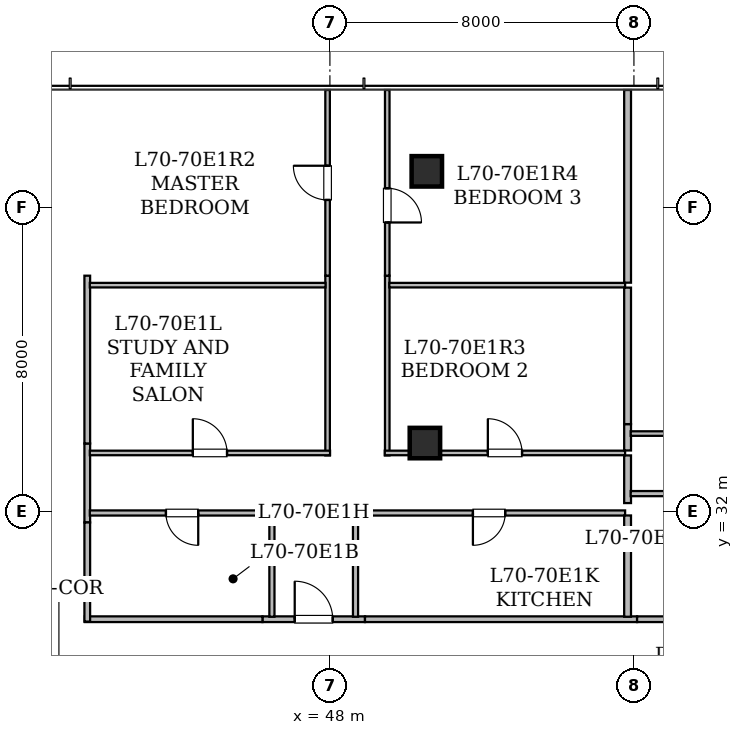
"""IFC4 building model, lengths in metres.
Left out: names, types, materials, properties, quantities, classifications, styles, units other than length and angle.
Written with IfcOpenShell. Run it as: python <this file> out.ifc"""

import sys

from ifc_helpers import new_model, si_unit, direction, frame, frame_2d, origin, origin_2d, place, context, subcontext, project, spatial, rectangle, hollow_rectangle, extrude, element, fill, save


model = new_model("IFC4")
c1 = context("Model", 3, precision=1e-05, world=origin(), true_north=direction((0.0, 1.0)))
c2 = subcontext(c1, "Body", "Model", "MODEL_VIEW")
j1 = project(units=[si_unit("LENGTHUNIT", "METRE"), si_unit("PLANEANGLEUNIT", "RADIAN")], contexts=[c1])
p1 = place(None, origin())
s1 = spatial("IfcSite", under=j1, at=p1, CompositionType="ELEMENT")
p2 = place(p1, origin())
s2 = spatial("IfcBuilding", under=s1, at=p2, CompositionType="ELEMENT")
p3 = place(p2, frame((0.0, 0.0, 273.65)))
s3 = spatial("IfcBuildingStorey", under=s2, at=p3, CompositionType="ELEMENT", Elevation=273.65)
p4 = place(p3, frame((50.55, 40.95, 0.0), z_axis=(0.0, 0.0, 1.0), x_axis=(1.0, 0.0, 0.0)))
e1 = element("IfcColumn", 1, at=p4, inside=s3, PredefinedType="COLUMN", context=c2, shape_type="SweptSolid", body=[
    extrude(hollow_rectangle(XDim=0.8, YDim=0.8, WallThickness=0.04, at=origin_2d()), origin(), (0.0, 0.0, 1.0), 4.175),
])
p5 = place(p3, frame((50.5, 33.8, 0.0), z_axis=(0.0, 0.0, 1.0), x_axis=(1.0, 0.0, 0.0)))
e2 = element("IfcColumn", 2, at=p5, inside=s3, PredefinedType="COLUMN", context=c2, shape_type="SweptSolid", body=[
    extrude(hollow_rectangle(XDim=0.8, YDim=0.8, WallThickness=0.04, at=origin_2d()), origin(), (0.0, 0.0, 1.0), 4.2),
])
p6 = place(p3, frame((46.225, 29.165, 0.0), z_axis=(0.0, 0.0, 1.0), x_axis=(1.0, 0.0, 0.0)))
e3 = element("IfcWall", 3, at=p6, inside=s3, PredefinedType="STANDARD", context=c2, shape_type="SweptSolid", body=[
    extrude(rectangle(XDim=2.698, YDim=0.15, at=frame_2d((1.349, 0.0))), origin(), (0.0, 0.0, 1.0), 3.78),
])
p7 = place(p6, frame((0.849, 0.0, 0.0)))
e4 = element("IfcOpeningElement", 4, at=p7, cuts=e3, PredefinedType="OPENING", context=c2, shape_type="SweptSolid", body=[
    extrude(rectangle(XDim=1.0, YDim=2.15, at=frame_2d((0.5, 1.075))), frame((0.0, 0.085, 0.0), z_axis=(0.0, -1.0, 0.0), x_axis=(1.0, 0.0, 0.0)), (0.0, 0.0, 1.0), 0.17),
])
p8 = place(p3, frame((41.615, 33.789, 0.0), z_axis=(0.0, 0.0, 1.0), x_axis=(0.0, -1.0, 0.0)))
e5 = element("IfcWall", 5, at=p8, inside=s3, PredefinedType="STANDARD", context=c2, shape_type="SweptSolid", body=[
    extrude(rectangle(XDim=2.078, YDim=0.15, at=frame_2d((1.039, 0.0))), origin(), (0.0, 0.0, 1.0), 3.78),
])
p9 = place(p3, frame((41.55, 29.165, 0.0), z_axis=(0.0, 0.0, 1.0), x_axis=(1.0, 0.0, 0.0)))
e6 = element("IfcWall", 6, at=p9, inside=s3, PredefinedType="STANDARD", context=c2, shape_type="SweptSolid", body=[
    extrude(rectangle(XDim=4.675, YDim=0.15, at=frame_2d((2.337, 0.0))), origin(), (0.0, 0.0, 1.0), 3.78),
])
p10 = place(p3, frame((41.615, 31.711, 0.0), z_axis=(0.0, 0.0, 1.0), x_axis=(0.0, -1.0, 0.0)))
e7 = element("IfcWall", 7, at=p10, inside=s3, PredefinedType="STANDARD", context=c2, shape_type="SweptSolid", body=[
    extrude(rectangle(XDim=2.609, YDim=0.15, at=frame_2d((1.304, 0.0))), origin(), (0.0, 0.0, 1.0), 3.78),
])
p11 = place(p3, frame((48.923, 29.165, 0.0), z_axis=(0.0, 0.0, 1.0), x_axis=(1.0, 0.0, 0.0)))
e8 = element("IfcWall", 8, at=p11, inside=s3, PredefinedType="STANDARD", context=c2, shape_type="SweptSolid", body=[
    extrude(rectangle(XDim=7.16, YDim=0.15, at=frame_2d((3.58, 0.0))), origin(), (0.0, 0.0, 1.0), 2.22),
])
p12 = place(p3, frame((41.615, 38.204, 0.0), z_axis=(0.0, 0.0, 1.0), x_axis=(0.0, -1.0, 0.0)))
e9 = element("IfcWall", 9, at=p12, inside=s3, PredefinedType="STANDARD", context=c2, shape_type="SweptSolid", body=[
    extrude(rectangle(XDim=4.415, YDim=0.15, at=frame_2d((2.208, 0.0))), origin(), (0.0, 0.0, 1.0), 2.22),
])
p13 = place(p3, frame((56.083, 29.165, 0.0), z_axis=(0.0, 0.0, 1.0), x_axis=(1.0, 0.0, 0.0)))
e10 = element("IfcWall", 10, at=p13, inside=s3, PredefinedType="STANDARD", context=c2, shape_type="SweptSolid", body=[
    extrude(rectangle(XDim=2.463, YDim=0.15, at=frame_2d((1.231, 0.0))), origin(), (0.0, 0.0, 1.0), 3.78),
])
p14 = place(p3, frame((46.474, 29.23, 0.0), z_axis=(0.0, 0.0, 1.0), x_axis=(0.0, 1.0, 0.0)))
e11 = element("IfcWall", 11, at=p14, inside=s3, PredefinedType="PARTITIONING", context=c2, shape_type="SweptSolid", body=[
    extrude(rectangle(XDim=2.795, YDim=0.135, at=frame_2d((1.397, 0.0))), origin(), (0.0, 0.0, 1.0), 3.78),
])
p15 = place(p3, frame((46.539, 31.96, 0.0), z_axis=(0.0, 0.0, 1.0), x_axis=(-1.0, 0.0, 0.0)))
e12 = element("IfcWall", 12, at=p15, inside=s3, PredefinedType="PARTITIONING", context=c2, shape_type="SweptSolid", body=[
    extrude(rectangle(XDim=4.857, YDim=0.135, at=frame_2d((2.429, 0.0))), origin(), (0.0, 0.0, 1.0), 3.78),
])
p16 = place(p15, frame((2.004, 0.0, 0.0)))
e13 = element("IfcOpeningElement", 13, at=p16, cuts=e12, PredefinedType="OPENING", context=c2, shape_type="SweptSolid", body=[
    extrude(rectangle(XDim=0.85, YDim=2.1, at=frame_2d((0.425, 1.05))), frame((0.0, 0.077, 0.0), z_axis=(0.0, -1.0, 0.0), x_axis=(1.0, 0.0, 0.0)), (0.0, 0.0, 1.0), 0.155),
])
p17 = place(p3, frame((55.768, 31.96, 0.0), z_axis=(0.0, 0.0, 1.0), x_axis=(-1.0, 0.0, 0.0)))
e14 = element("IfcWall", 14, at=p17, inside=s3, PredefinedType="PARTITIONING", context=c2, shape_type="SweptSolid", body=[
    extrude(rectangle(XDim=7.159, YDim=0.135, at=frame_2d((3.58, 0.0))), origin(), (0.0, 0.0, 1.0), 2.22),
])
p18 = place(p17, frame((3.155, 0.0, 0.0)))
e15 = element("IfcOpeningElement", 15, at=p18, cuts=e14, PredefinedType="OPENING", context=c2, shape_type="SweptSolid", body=[
    extrude(rectangle(XDim=0.85, YDim=2.1, at=frame_2d((0.425, 1.05))), frame((0.0, 0.077, 0.0), z_axis=(0.0, -1.0, 0.0), x_axis=(1.0, 0.0, 0.0)), (0.0, 0.0, 1.0), 0.155),
])
p19 = place(p3, frame((48.674, 32.025, 0.0), z_axis=(0.0, 0.0, 1.0), x_axis=(0.0, -1.0, 0.0)))
e16 = element("IfcWall", 16, at=p19, inside=s3, PredefinedType="PARTITIONING", context=c2, shape_type="SweptSolid", body=[
    extrude(rectangle(XDim=2.795, YDim=0.135, at=frame_2d((1.397, 0.0))), origin(), (0.0, 0.0, 1.0), 3.78),
])
p20 = place(p3, frame((47.939, 33.475, 0.0), z_axis=(0.0, 0.0, 1.0), x_axis=(0.0, 1.0, 0.0)))
e17 = element("IfcWall", 17, at=p20, inside=s3, PredefinedType="PARTITIONING", context=c2, shape_type="SweptSolid", body=[
    extrude(rectangle(XDim=4.729, YDim=0.12, at=frame_2d((2.365, 0.0))), origin(), (0.0, 0.0, 1.0), 2.22),
])
p21 = place(p3, frame((41.682, 33.54, 0.0), z_axis=(0.0, 0.0, 1.0), x_axis=(1.0, 0.0, 0.0)))
e18 = element("IfcWall", 18, at=p21, inside=s3, PredefinedType="PARTITIONING", context=c2, shape_type="SweptSolid", body=[
    extrude(rectangle(XDim=6.322, YDim=0.12, at=frame_2d((3.161, 0.0))), origin(), (0.0, 0.0, 1.0), 3.78),
])
p22 = place(p21, frame((2.711, 0.0, 0.0)))
e19 = element("IfcOpeningElement", 19, at=p22, cuts=e18, PredefinedType="OPENING", context=c2, shape_type="SweptSolid", body=[
    extrude(rectangle(XDim=0.9, YDim=2.1, at=frame_2d((0.45, 1.05))), frame((0.0, 0.07, 0.0), z_axis=(0.0, -1.0, 0.0), x_axis=(1.0, 0.0, 0.0)), (0.0, 0.0, 1.0), 0.14),
])
p23 = place(p3, frame((47.939, 38.204, 0.0), z_axis=(0.0, 0.0, 1.0), x_axis=(0.0, 1.0, 0.0)))
e20 = element("IfcWall", 20, at=p23, inside=s3, PredefinedType="PARTITIONING", context=c2, shape_type="SweptSolid", body=[
    extrude(rectangle(XDim=4.886, YDim=0.12, at=frame_2d((2.443, 0.0))), origin(), (0.0, 0.0, 1.0), 2.22),
])
p24 = place(p23, frame((1.993, 0.0, 0.0)))
e21 = element("IfcOpeningElement", 21, at=p24, cuts=e20, PredefinedType="OPENING", context=c2, shape_type="SweptSolid", body=[
    extrude(rectangle(XDim=0.9, YDim=2.1, at=frame_2d((0.45, 1.05))), frame((0.0, 0.07, 0.0), z_axis=(0.0, -1.0, 0.0), x_axis=(1.0, 0.0, 0.0)), (0.0, 0.0, 1.0), 0.14),
])
p25 = place(p3, frame((49.509, 38.204, 0.0), z_axis=(0.0, 0.0, 1.0), x_axis=(0.0, -1.0, 0.0)))
e22 = element("IfcWall", 22, at=p25, inside=s3, PredefinedType="PARTITIONING", context=c2, shape_type="SweptSolid", body=[
    extrude(rectangle(XDim=4.729, YDim=0.12, at=frame_2d((2.365, 0.0))), origin(), (0.0, 0.0, 1.0), 2.22),
])
p26 = place(p3, frame((49.444, 33.54, 0.0), z_axis=(0.0, 0.0, 1.0), x_axis=(1.0, 0.0, 0.0)))
e23 = element("IfcWall", 23, at=p26, inside=s3, PredefinedType="PARTITIONING", context=c2, shape_type="SweptSolid", body=[
    extrude(rectangle(XDim=6.324, YDim=0.12, at=frame_2d((3.162, 0.0))), origin(), (0.0, 0.0, 1.0), 2.22),
])
p27 = place(p26, frame((2.712, 0.0, 0.0)))
e24 = element("IfcOpeningElement", 24, at=p27, cuts=e23, PredefinedType="OPENING", context=c2, shape_type="SweptSolid", body=[
    extrude(rectangle(XDim=0.9, YDim=2.1, at=frame_2d((0.45, 1.05))), frame((0.0, 0.07, 0.0), z_axis=(0.0, -1.0, 0.0), x_axis=(1.0, 0.0, 0.0)), (0.0, 0.0, 1.0), 0.14),
])
p28 = place(p3, frame((49.509, 43.09, 0.0), z_axis=(0.0, 0.0, 1.0), x_axis=(0.0, -1.0, 0.0)))
e25 = element("IfcWall", 25, at=p28, inside=s3, PredefinedType="PARTITIONING", context=c2, shape_type="SweptSolid", body=[
    extrude(rectangle(XDim=4.886, YDim=0.12, at=frame_2d((2.443, 0.0))), origin(), (0.0, 0.0, 1.0), 2.22),
])
p29 = place(p28, frame((2.586, 0.0, 0.0)))
e26 = element("IfcOpeningElement", 26, at=p29, cuts=e25, PredefinedType="OPENING", context=c2, shape_type="SweptSolid", body=[
    extrude(rectangle(XDim=0.9, YDim=2.1, at=frame_2d((0.45, 1.05))), frame((0.0, 0.07, 0.0), z_axis=(0.0, -1.0, 0.0), x_axis=(1.0, 0.0, 0.0)), (0.0, 0.0, 1.0), 0.14),
])
p30 = place(p3, frame((55.833, 33.475, 0.0), z_axis=(0.0, 0.0, 1.0), x_axis=(0.0, -1.0, 0.0)))
e27 = element("IfcWall", 27, at=p30, inside=s3, PredefinedType="STANDARD", context=c2, shape_type="SweptSolid", body=[
    extrude(rectangle(XDim=1.254, YDim=0.18, at=frame_2d((0.627, 0.0))), origin(), (0.0, 0.0, 1.0), 2.22),
])
p31 = place(p3, frame((55.833, 31.895, 0.0), z_axis=(0.0, 0.0, 1.0), x_axis=(0.0, -1.0, 0.0)))
e28 = element("IfcWall", 28, at=p31, inside=s3, PredefinedType="STANDARD", context=c2, shape_type="SweptSolid", body=[
    extrude(rectangle(XDim=2.665, YDim=0.18, at=frame_2d((1.333, 0.0))), origin(), (0.0, 0.0, 1.0), 3.78),
])
p32 = place(p3, frame((41.682, 37.955, 0.0), z_axis=(0.0, 0.0, 1.0), x_axis=(1.0, 0.0, 0.0)))
e29 = element("IfcWall", 29, at=p32, inside=s3, PredefinedType="PARTITIONING", context=c2, shape_type="SweptSolid", body=[
    extrude(rectangle(XDim=6.203, YDim=0.12, at=frame_2d((3.102, 0.0))), origin(), (0.0, 0.0, 1.0), 3.78),
])
p33 = place(p3, frame((49.563, 37.955, 0.0), z_axis=(0.0, 0.0, 1.0), x_axis=(1.0, 0.0, 0.0)))
e30 = element("IfcWall", 30, at=p33, inside=s3, PredefinedType="PARTITIONING", context=c2, shape_type="SweptSolid", body=[
    extrude(rectangle(XDim=6.205, YDim=0.12, at=frame_2d((3.103, 0.0))), origin(), (0.0, 0.0, 1.0), 2.22),
])
p34 = place(p3, frame((55.833, 34.299, 0.0), z_axis=(0.0, 0.0, 1.0), x_axis=(0.0, -1.0, 0.0)))
e31 = element("IfcWall", 31, at=p34, inside=s3, PredefinedType="STANDARD", context=c2, shape_type="SweptSolid", body=[
    extrude(rectangle(XDim=0.694, YDim=0.18, at=frame_2d((0.347, 0.0))), origin(), (0.0, 0.0, 1.0), 2.22),
])
p35 = place(p3, frame((55.833, 37.89, 0.0), z_axis=(0.0, 0.0, 1.0), x_axis=(0.0, -1.0, 0.0)))
e32 = element("IfcWall", 32, at=p35, inside=s3, PredefinedType="STANDARD", context=c2, shape_type="SweptSolid", body=[
    extrude(rectangle(XDim=3.591, YDim=0.18, at=frame_2d((1.795, 0.0))), origin(), (0.0, 0.0, 1.0), 2.22),
])
p36 = place(p3, frame((55.833, 43.09, 0.0), z_axis=(0.0, 0.0, 1.0), x_axis=(0.0, -1.0, 0.0)))
e33 = element("IfcWall", 33, at=p36, inside=s3, PredefinedType="STANDARD", context=c2, shape_type="SweptSolid", body=[
    extrude(rectangle(XDim=5.07, YDim=0.18, at=frame_2d((2.535, 0.0))), origin(), (0.0, 0.0, 1.0), 2.22),
])
p37 = place(p3, frame((58.86, 32.47, 0.0), z_axis=(0.0, 0.0, 1.0), x_axis=(-1.0, 0.0, 0.0)))
e34 = element("IfcWall", 34, at=p37, inside=s3, PredefinedType="PARTITIONING", context=c2, shape_type="SweptSolid", body=[
    extrude(rectangle(XDim=2.945, YDim=0.135, at=frame_2d((1.473, 0.0))), origin(), (0.0, 0.0, 1.0), 3.78),
])
p38 = place(p3, frame((55.915, 34.05, 0.0), z_axis=(0.0, 0.0, 1.0), x_axis=(1.0, 0.0, 0.0)))
e35 = element("IfcWall", 35, at=p38, inside=s3, PredefinedType="PARTITIONING", context=c2, shape_type="SweptSolid", body=[
    extrude(rectangle(XDim=5.259, YDim=0.12, at=frame_2d((2.629, 0.0))), origin(), (0.0, 0.0, 1.0), 2.22),
])
p39 = place(p7, origin())
e36 = element("IfcDoor", 36, at=p39, inside=s3, OperationType="SINGLE_SWING_LEFT", PredefinedType="DOOR", context=c2, shape_type="SweptSolid", body=[
    extrude(rectangle(XDim=1.0, YDim=2.15, at=frame_2d((0.5, 1.075))), frame((0.0, 0.025, 0.0), z_axis=(0.0, -1.0, 0.0), x_axis=(1.0, 0.0, 0.0)), (0.0, 0.0, 1.0), 0.05),
])
fill(e4, e36)
p40 = place(p16, origin())
e37 = element("IfcDoor", 37, at=p40, inside=s3, OperationType="SINGLE_SWING_LEFT", PredefinedType="DOOR", context=c2, shape_type="SweptSolid", body=[
    extrude(rectangle(XDim=0.85, YDim=2.1, at=frame_2d((0.425, 1.05))), frame((0.0, 0.025, 0.0), z_axis=(0.0, -1.0, 0.0), x_axis=(1.0, 0.0, 0.0)), (0.0, 0.0, 1.0), 0.05),
])
fill(e13, e37)
p41 = place(p18, origin())
e38 = element("IfcDoor", 38, at=p41, inside=s3, OperationType="SINGLE_SWING_RIGHT", PredefinedType="DOOR", context=c2, shape_type="SweptSolid", body=[
    extrude(rectangle(XDim=0.85, YDim=2.1, at=frame_2d((0.425, 1.05))), frame((0.0, 0.025, 0.0), z_axis=(0.0, -1.0, 0.0), x_axis=(1.0, 0.0, 0.0)), (0.0, 0.0, 1.0), 0.05),
])
fill(e15, e38)
p42 = place(p22, origin())
e39 = element("IfcDoor", 39, at=p42, inside=s3, OperationType="SINGLE_SWING_LEFT", PredefinedType="DOOR", context=c2, shape_type="SweptSolid", body=[
    extrude(rectangle(XDim=0.9, YDim=2.1, at=frame_2d((0.45, 1.05))), frame((0.0, 0.025, 0.0), z_axis=(0.0, -1.0, 0.0), x_axis=(1.0, 0.0, 0.0)), (0.0, 0.0, 1.0), 0.05),
])
fill(e19, e39)
p43 = place(p24, origin())
e40 = element("IfcDoor", 40, at=p43, inside=s3, OperationType="SINGLE_SWING_RIGHT", PredefinedType="DOOR", context=c2, shape_type="SweptSolid", body=[
    extrude(rectangle(XDim=0.9, YDim=2.1, at=frame_2d((0.45, 1.05))), frame((0.0, 0.025, 0.0), z_axis=(0.0, -1.0, 0.0), x_axis=(1.0, 0.0, 0.0)), (0.0, 0.0, 1.0), 0.05),
])
fill(e21, e40)
p44 = place(p27, origin())
e41 = element("IfcDoor", 41, at=p44, inside=s3, OperationType="SINGLE_SWING_LEFT", PredefinedType="DOOR", context=c2, shape_type="SweptSolid", body=[
    extrude(rectangle(XDim=0.9, YDim=2.1, at=frame_2d((0.45, 1.05))), frame((0.0, 0.025, 0.0), z_axis=(0.0, -1.0, 0.0), x_axis=(1.0, 0.0, 0.0)), (0.0, 0.0, 1.0), 0.05),
])
fill(e24, e41)
p45 = place(p29, origin())
e42 = element("IfcDoor", 42, at=p45, inside=s3, OperationType="SINGLE_SWING_RIGHT", PredefinedType="DOOR", context=c2, shape_type="SweptSolid", body=[
    extrude(rectangle(XDim=0.9, YDim=2.1, at=frame_2d((0.45, 1.05))), frame((0.0, 0.025, 0.0), z_axis=(0.0, -1.0, 0.0), x_axis=(1.0, 0.0, 0.0)), (0.0, 0.0, 1.0), 0.05),
])
fill(e26, e42)
save(model, sys.argv[1])
